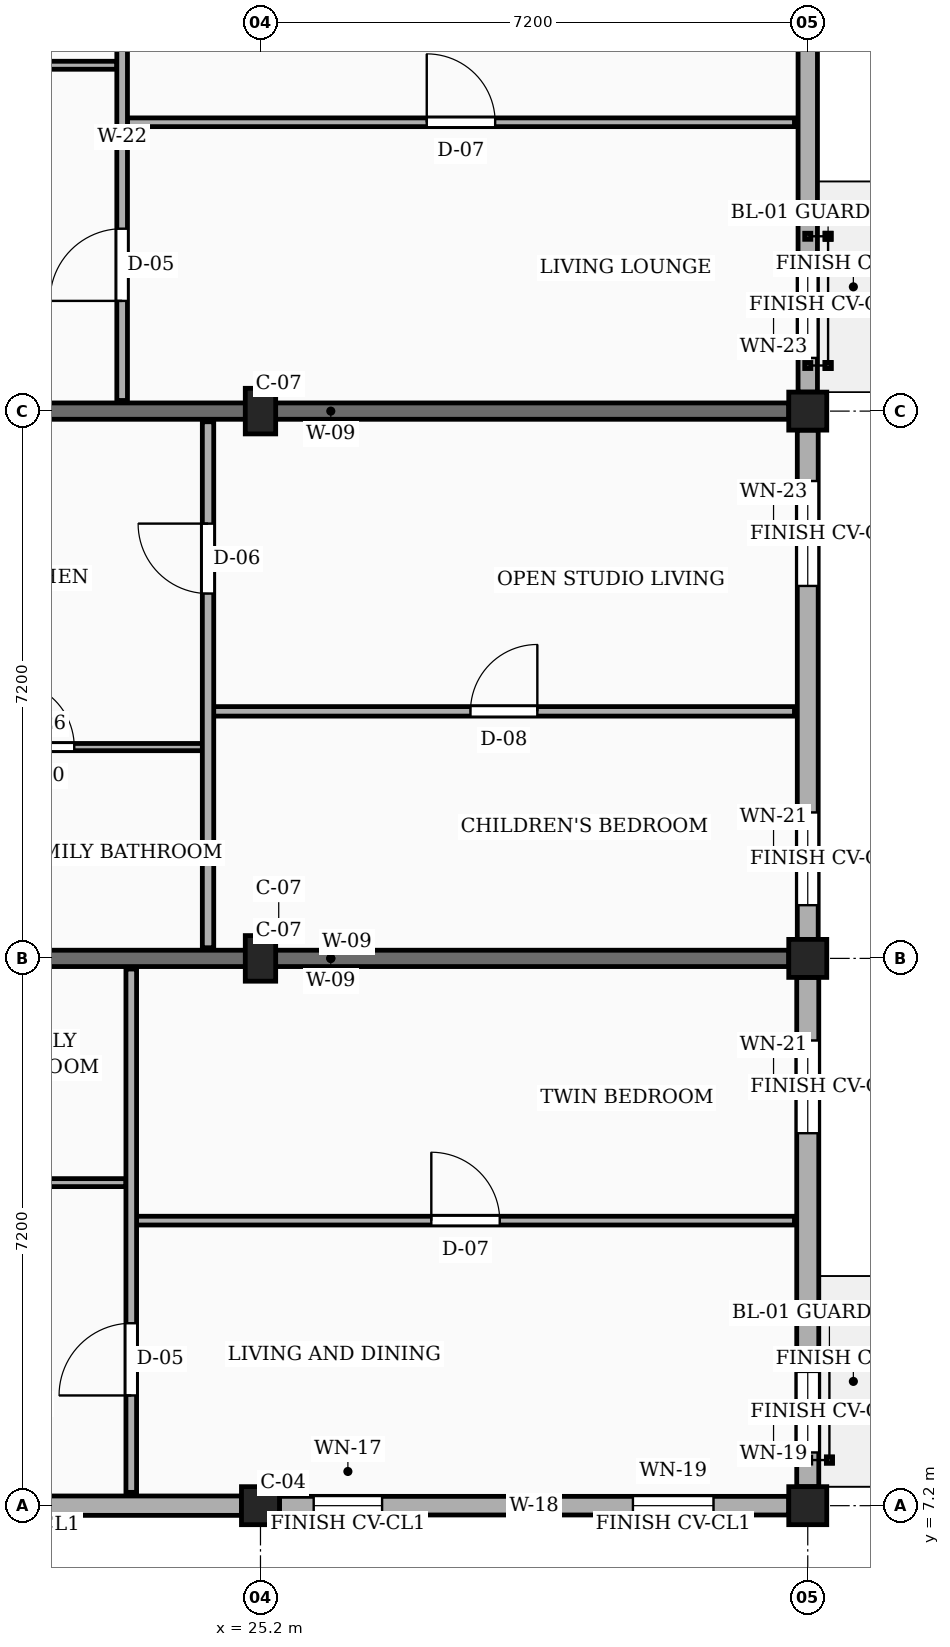
"""IFC4 building model, lengths in metres.
Left out: names, types, materials, properties, quantities, classifications, styles, units other than length and angle.
Written with IfcOpenShell. Run it as: python <this file> out.ifc"""

import sys

from ifc_helpers import new_model, si_unit, direction, frame, frame_2d, origin, origin_2d, place, context, subcontext, project, spatial, rectangle, extrude, element, fill, save


model = new_model("IFC4")
c1 = context("Model", 3, precision=1e-05, world=origin(), true_north=direction((0.0, 1.0)))
c2 = subcontext(c1, "Body", "Model", "MODEL_VIEW")
j1 = project(units=[si_unit("LENGTHUNIT", "METRE"), si_unit("PLANEANGLEUNIT", "RADIAN")], contexts=[c1])
p1 = place(None, origin())
s1 = spatial("IfcSite", under=j1, at=p1, CompositionType="ELEMENT")
p2 = place(p1, origin())
s2 = spatial("IfcBuilding", under=s1, at=p2, CompositionType="ELEMENT")
p3 = place(p2, frame((0.0, 0.0, 32.85)))
s3 = spatial("IfcBuildingStorey", under=s2, at=p3, CompositionType="ELEMENT", Elevation=32.85)
p4 = place(p3, frame((25.2, 7.2, 0.0), z_axis=(0.0, 0.0, 1.0), x_axis=(1.0, 0.0, 0.0)))
e1 = element("IfcColumn", 1, at=p4, inside=s3, PredefinedType="COLUMN", context=c2, shape_type="SweptSolid", body=[
    extrude(rectangle(XDim=0.5, YDim=0.5, at=origin_2d()), origin(), (0.0, 0.0, 1.0), 3.15),
])
for number, where, z_axis, x_axis in (
    (2, (25.2, 14.4, 0.0), (0.0, 0.0, 1.0), (1.0, 0.0, 0.0)),
    (3, (25.2, 21.6, 0.0), (0.0, 0.0, 1.0), (1.0, 0.0, 0.0)),
):
    element("IfcColumn", number, at=place(p3, frame(where, z_axis=z_axis, x_axis=x_axis)), inside=s3, PredefinedType="COLUMN", context=c2, shape_type="SweptSolid", body=[
        extrude(rectangle(XDim=0.4, YDim=0.6, at=origin_2d()), origin(), (0.0, 0.0, 1.0), 3.15),
    ])
for number, where, z_axis, x_axis in (
    (4, (32.4, 7.2, 0.0), (0.0, 0.0, 1.0), (1.0, 0.0, 0.0)),
    (5, (32.4, 14.4, 0.0), (0.0, 0.0, 1.0), (1.0, 0.0, 0.0)),
    (6, (32.4, 21.6, 0.0), (0.0, 0.0, 1.0), (1.0, 0.0, 0.0)),
):
    element("IfcColumn", number, at=place(p3, frame(where, z_axis=z_axis, x_axis=x_axis)), inside=s3, PredefinedType="COLUMN", context=c2, shape_type="SweptSolid", body=[
        extrude(rectangle(XDim=0.5, YDim=0.5, at=origin_2d()), origin(), (0.0, 0.0, 1.0), 3.15),
    ])
for number, where, z_axis, x_axis in (
    (7, (20.1, 14.4, 0.0), (0.0, 0.0, 1.0), (1.0, 0.0, 0.0)),
    (8, (20.1, 21.6, 0.0), (0.0, 0.0, 1.0), (1.0, 0.0, 0.0)),
):
    element("IfcWall", number, at=place(p3, frame(where, z_axis=z_axis, x_axis=x_axis)), inside=s3, PredefinedType="SOLIDWALL", context=c2, shape_type="SweptSolid", body=[
        extrude(rectangle(XDim=12.05, YDim=0.215, at=frame_2d((6.025, 0.0))), origin(), (0.0, 0.0, 1.0), 2.17),
    ])
p5 = place(p3, frame((18.25, 7.2, 0.0), z_axis=(0.0, 0.0, 1.0), x_axis=(1.0, 0.0, 0.0)))
e9 = element("IfcWall", 9, at=p5, inside=s3, PredefinedType="SOLIDWALL", context=c2, shape_type="SweptSolid", body=[
    extrude(rectangle(XDim=6.7, YDim=0.255, at=frame_2d((3.35, 0.0))), origin(), (0.0, 0.0, 1.0), 2.44),
])
p6 = place(p5, frame((0.475, 0.0, 0.78)))
e10 = element("IfcOpeningElement", 10, at=p6, cuts=e9, PredefinedType="OPENING", context=c2, shape_type="SweptSolid", body=[
    extrude(rectangle(XDim=1.04, YDim=1.26, at=frame_2d((0.52, 0.63))), frame((0.0, 0.137, 0.0), z_axis=(0.0, -1.0, 0.0), x_axis=(1.0, 0.0, 0.0)), (0.0, 0.0, 1.0), 0.275),
])
p7 = place(p5, frame((3.1, 0.0, 0.78)))
e11 = element("IfcOpeningElement", 11, at=p7, cuts=e9, PredefinedType="OPENING", context=c2, shape_type="SweptSolid", body=[
    extrude(rectangle(XDim=0.9, YDim=1.36, at=frame_2d((0.45, 0.68))), frame((0.0, 0.137, 0.0), z_axis=(0.0, -1.0, 0.0), x_axis=(1.0, 0.0, 0.0)), (0.0, 0.0, 1.0), 0.275),
])
p8 = place(p3, frame((25.45, 7.2, 0.0), z_axis=(0.0, 0.0, 1.0), x_axis=(1.0, 0.0, 0.0)))
e12 = element("IfcWall", 12, at=p8, inside=s3, PredefinedType="SOLIDWALL", context=c2, shape_type="SweptSolid", body=[
    extrude(rectangle(XDim=6.7, YDim=0.245, at=frame_2d((3.35, 0.0))), origin(), (0.0, 0.0, 1.0), 2.44),
])
p9 = place(p8, frame((0.45, 0.0, 0.78)))
e13 = element("IfcOpeningElement", 13, at=p9, cuts=e12, PredefinedType="OPENING", context=c2, shape_type="SweptSolid", body=[
    extrude(rectangle(XDim=0.9, YDim=1.36, at=frame_2d((0.45, 0.68))), frame((0.0, 0.133, 0.0), z_axis=(0.0, -1.0, 0.0), x_axis=(1.0, 0.0, 0.0)), (0.0, 0.0, 1.0), 0.265),
])
p10 = place(p8, frame((4.65, 0.0, 0.78)))
e14 = element("IfcOpeningElement", 14, at=p10, cuts=e12, PredefinedType="OPENING", context=c2, shape_type="SweptSolid", body=[
    extrude(rectangle(XDim=1.06, YDim=1.36, at=frame_2d((0.53, 0.68))), frame((0.0, 0.133, 0.0), z_axis=(0.0, -1.0, 0.0), x_axis=(1.0, 0.0, 0.0)), (0.0, 0.0, 1.0), 0.265),
])
p11 = place(p3, frame((32.4, 7.45, 0.0), z_axis=(0.0, 0.0, 1.0), x_axis=(0.0, 1.0, 0.0)))
e15 = element("IfcWall", 15, at=p11, inside=s3, PredefinedType="SOLIDWALL", context=c2, shape_type="SweptSolid", body=[
    extrude(rectangle(XDim=6.7, YDim=0.29, at=frame_2d((3.35, 0.0))), origin(), (0.0, 0.0, 1.0), 2.44),
])
p12 = place(p11, frame((0.45, 0.0, 0.78)))
e16 = element("IfcOpeningElement", 16, at=p12, cuts=e15, PredefinedType="OPENING", context=c2, shape_type="SweptSolid", body=[
    extrude(rectangle(XDim=1.06, YDim=1.36, at=frame_2d((0.53, 0.68))), frame((0.0, 0.155, 0.0), z_axis=(0.0, -1.0, 0.0), x_axis=(1.0, 0.0, 0.0)), (0.0, 0.0, 1.0), 0.31),
])
p13 = place(p11, frame((4.65, 0.0, 0.78)))
e17 = element("IfcOpeningElement", 17, at=p13, cuts=e15, PredefinedType="OPENING", context=c2, shape_type="SweptSolid", body=[
    extrude(rectangle(XDim=1.22, YDim=1.36, at=frame_2d((0.61, 0.68))), frame((0.0, 0.155, 0.0), z_axis=(0.0, -1.0, 0.0), x_axis=(1.0, 0.0, 0.0)), (0.0, 0.0, 1.0), 0.31),
])
p14 = place(p3, frame((32.4, 14.65, 0.0), z_axis=(0.0, 0.0, 1.0), x_axis=(0.0, 1.0, 0.0)))
e18 = element("IfcWall", 18, at=p14, inside=s3, PredefinedType="SOLIDWALL", context=c2, shape_type="SweptSolid", body=[
    extrude(rectangle(XDim=6.7, YDim=0.275, at=frame_2d((3.35, 0.0))), origin(), (0.0, 0.0, 1.0), 2.44),
])
p15 = place(p14, frame((0.45, 0.0, 0.78)))
e19 = element("IfcOpeningElement", 19, at=p15, cuts=e18, PredefinedType="OPENING", context=c2, shape_type="SweptSolid", body=[
    extrude(rectangle(XDim=1.22, YDim=1.36, at=frame_2d((0.61, 0.68))), frame((0.0, 0.147, 0.0), z_axis=(0.0, -1.0, 0.0), x_axis=(1.0, 0.0, 0.0)), (0.0, 0.0, 1.0), 0.295),
])
p16 = place(p14, frame((4.65, 0.0, 0.78)))
e20 = element("IfcOpeningElement", 20, at=p16, cuts=e18, PredefinedType="OPENING", context=c2, shape_type="SweptSolid", body=[
    extrude(rectangle(XDim=1.38, YDim=1.36, at=frame_2d((0.69, 0.68))), frame((0.0, 0.147, 0.0), z_axis=(0.0, -1.0, 0.0), x_axis=(1.0, 0.0, 0.0)), (0.0, 0.0, 1.0), 0.295),
])
p17 = place(p3, frame((32.4, 21.85, 0.0), z_axis=(0.0, 0.0, 1.0), x_axis=(0.0, 1.0, 0.0)))
e21 = element("IfcWall", 21, at=p17, inside=s3, PredefinedType="SOLIDWALL", context=c2, shape_type="SweptSolid", body=[
    extrude(rectangle(XDim=6.7, YDim=0.255, at=frame_2d((3.35, 0.0))), origin(), (0.0, 0.0, 1.0), 2.44),
])
p18 = place(p17, frame((0.45, 0.0, 0.78)))
e22 = element("IfcOpeningElement", 22, at=p18, cuts=e21, PredefinedType="OPENING", context=c2, shape_type="SweptSolid", body=[
    extrude(rectangle(XDim=1.38, YDim=1.36, at=frame_2d((0.69, 0.68))), frame((0.0, 0.137, 0.0), z_axis=(0.0, -1.0, 0.0), x_axis=(1.0, 0.0, 0.0)), (0.0, 0.0, 1.0), 0.275),
])
p19 = place(p17, frame((4.65, 0.0, 0.78)))
e23 = element("IfcOpeningElement", 23, at=p19, cuts=e21, PredefinedType="OPENING", context=c2, shape_type="SweptSolid", body=[
    extrude(rectangle(XDim=0.94, YDim=1.44, at=frame_2d((0.47, 0.72))), frame((0.0, 0.137, 0.0), z_axis=(0.0, -1.0, 0.0), x_axis=(1.0, 0.0, 0.0)), (0.0, 0.0, 1.0), 0.275),
])
p20 = place(p3, frame((23.57, 10.95, 0.0), z_axis=(0.0, 0.0, 1.0), x_axis=(1.0, 0.0, 0.0)))
e24 = element("IfcWall", 24, at=p20, inside=s3, PredefinedType="PARTITIONING", context=c2, shape_type="SweptSolid", body=[
    extrude(rectangle(XDim=8.655, YDim=0.115, at=frame_2d((4.328, 0.0))), origin(), (0.0, 0.0, 1.0), 2.305),
])
p21 = place(p20, frame((3.877, 0.0, 0.0)))
e25 = element("IfcOpeningElement", 25, at=p21, cuts=e24, PredefinedType="OPENING", context=c2, shape_type="SweptSolid", body=[
    extrude(rectangle(XDim=0.9, YDim=2.1, at=frame_2d((0.45, 1.05))), frame((0.0, 0.067, 0.0), z_axis=(0.0, -1.0, 0.0), x_axis=(1.0, 0.0, 0.0)), (0.0, 0.0, 1.0), 0.135),
])
p22 = place(p3, frame((20.19, 11.45, 0.0), z_axis=(0.0, 0.0, 1.0), x_axis=(1.0, 0.0, 0.0)))
e26 = element("IfcWall", 26, at=p22, inside=s3, PredefinedType="PARTITIONING", context=c2, shape_type="SweptSolid", body=[
    extrude(rectangle(XDim=3.24, YDim=0.105, at=frame_2d((1.62, 0.0))), origin(), (0.0, 0.0, 1.0), 2.305),
])
p23 = place(p22, frame((1.17, 0.0, 0.0)))
e27 = element("IfcOpeningElement", 27, at=p23, cuts=e26, PredefinedType="OPENING", context=c2, shape_type="SweptSolid", body=[
    extrude(rectangle(XDim=0.9, YDim=2.05, at=frame_2d((0.45, 1.025))), frame((0.0, 0.062, 0.0), z_axis=(0.0, -1.0, 0.0), x_axis=(1.0, 0.0, 0.0)), (0.0, 0.0, 1.0), 0.125),
])
p24 = place(p3, frame((23.5, 7.375, 0.0), z_axis=(0.0, 0.0, 1.0), x_axis=(0.0, 1.0, 0.0)))
e28 = element("IfcWall", 28, at=p24, inside=s3, PredefinedType="PARTITIONING", context=c2, shape_type="SweptSolid", body=[
    extrude(rectangle(XDim=6.885, YDim=0.14, at=frame_2d((3.442, 0.0))), origin(), (0.0, 0.0, 1.0), 2.305),
])
p25 = place(p24, frame((1.275, 0.0, 0.0)))
e29 = element("IfcOpeningElement", 29, at=p25, cuts=e28, PredefinedType="OPENING", context=c2, shape_type="SweptSolid", body=[
    extrude(rectangle(XDim=0.95, YDim=2.1, at=frame_2d((0.475, 1.05))), frame((0.0, 0.08, 0.0), z_axis=(0.0, -1.0, 0.0), x_axis=(1.0, 0.0, 0.0)), (0.0, 0.0, 1.0), 0.16),
])
p26 = place(p3, frame((24.58, 17.65, 0.0), z_axis=(0.0, 0.0, 1.0), x_axis=(1.0, 0.0, 0.0)))
e30 = element("IfcWall", 30, at=p26, inside=s3, PredefinedType="PARTITIONING", context=c2, shape_type="SweptSolid", body=[
    extrude(rectangle(XDim=7.645, YDim=0.125, at=frame_2d((3.823, 0.0))), origin(), (0.0, 0.0, 1.0), 2.305),
])
p27 = place(p26, frame((3.383, 0.0, 0.0)))
e31 = element("IfcOpeningElement", 31, at=p27, cuts=e30, PredefinedType="OPENING", context=c2, shape_type="SweptSolid", body=[
    extrude(rectangle(XDim=0.88, YDim=2.08, at=frame_2d((0.44, 1.04))), frame((0.0, 0.073, 0.0), z_axis=(0.0, -1.0, 0.0), x_axis=(1.0, 0.0, 0.0)), (0.0, 0.0, 1.0), 0.145),
])
p28 = place(p3, frame((20.19, 17.18, 0.0), z_axis=(0.0, 0.0, 1.0), x_axis=(1.0, 0.0, 0.0)))
e32 = element("IfcWall", 32, at=p28, inside=s3, PredefinedType="PARTITIONING", context=c2, shape_type="SweptSolid", body=[
    extrude(rectangle(XDim=4.25, YDim=0.095, at=frame_2d((2.125, 0.0))), origin(), (0.0, 0.0, 1.0), 2.305),
])
p29 = place(p28, frame((1.69, 0.0, 0.0)))
e33 = element("IfcOpeningElement", 33, at=p29, cuts=e32, PredefinedType="OPENING", context=c2, shape_type="SweptSolid", body=[
    extrude(rectangle(XDim=0.87, YDim=2.05, at=frame_2d((0.435, 1.025))), frame((0.0, 0.058, 0.0), z_axis=(0.0, -1.0, 0.0), x_axis=(1.0, 0.0, 0.0)), (0.0, 0.0, 1.0), 0.115),
])
p30 = place(p3, frame((24.51, 14.54, 0.0), z_axis=(0.0, 0.0, 1.0), x_axis=(0.0, 1.0, 0.0)))
e34 = element("IfcWall", 34, at=p30, inside=s3, PredefinedType="PARTITIONING", context=c2, shape_type="SweptSolid", body=[
    extrude(rectangle(XDim=6.92, YDim=0.15, at=frame_2d((3.46, 0.0))), origin(), (0.0, 0.0, 1.0), 2.305),
])
p31 = place(p30, frame((4.66, 0.0, 0.0)))
e35 = element("IfcOpeningElement", 35, at=p31, cuts=e34, PredefinedType="OPENING", context=c2, shape_type="SweptSolid", body=[
    extrude(rectangle(XDim=0.92, YDim=2.1, at=frame_2d((0.46, 1.05))), frame((0.0, 0.085, 0.0), z_axis=(0.0, -1.0, 0.0), x_axis=(1.0, 0.0, 0.0)), (0.0, 0.0, 1.0), 0.17),
])
p32 = place(p3, frame((23.45, 25.4, 0.0), z_axis=(0.0, 0.0, 1.0), x_axis=(1.0, 0.0, 0.0)))
e36 = element("IfcWall", 36, at=p32, inside=s3, PredefinedType="PARTITIONING", context=c2, shape_type="SweptSolid", body=[
    extrude(rectangle(XDim=8.775, YDim=0.115, at=frame_2d((4.388, 0.0))), origin(), (0.0, 0.0, 1.0), 2.305),
])
p33 = place(p32, frame((3.938, 0.0, 0.0)))
e37 = element("IfcOpeningElement", 37, at=p33, cuts=e36, PredefinedType="OPENING", context=c2, shape_type="SweptSolid", body=[
    extrude(rectangle(XDim=0.9, YDim=2.1, at=frame_2d((0.45, 1.05))), frame((0.0, 0.067, 0.0), z_axis=(0.0, -1.0, 0.0), x_axis=(1.0, 0.0, 0.0)), (0.0, 0.0, 1.0), 0.135),
])
p34 = place(p3, frame((20.19, 26.15, 0.0), z_axis=(0.0, 0.0, 1.0), x_axis=(1.0, 0.0, 0.0)))
e38 = element("IfcWall", 38, at=p34, inside=s3, PredefinedType="PARTITIONING", context=c2, shape_type="SweptSolid", body=[
    extrude(rectangle(XDim=3.12, YDim=0.105, at=frame_2d((1.56, 0.0))), origin(), (0.0, 0.0, 1.0), 2.305),
])
p35 = place(p34, frame((1.11, 0.0, 0.0)))
e39 = element("IfcOpeningElement", 39, at=p35, cuts=e38, PredefinedType="OPENING", context=c2, shape_type="SweptSolid", body=[
    extrude(rectangle(XDim=0.9, YDim=2.05, at=frame_2d((0.45, 1.025))), frame((0.0, 0.062, 0.0), z_axis=(0.0, -1.0, 0.0), x_axis=(1.0, 0.0, 0.0)), (0.0, 0.0, 1.0), 0.125),
])
p36 = place(p3, frame((23.38, 21.74, 0.0), z_axis=(0.0, 0.0, 1.0), x_axis=(0.0, 1.0, 0.0)))
e40 = element("IfcWall", 40, at=p36, inside=s3, PredefinedType="PARTITIONING", context=c2, shape_type="SweptSolid", body=[
    extrude(rectangle(XDim=6.92, YDim=0.14, at=frame_2d((3.46, 0.0))), origin(), (0.0, 0.0, 1.0), 2.305),
])
p37 = place(p36, frame((1.31, 0.0, 0.0)))
e41 = element("IfcOpeningElement", 41, at=p37, cuts=e40, PredefinedType="OPENING", context=c2, shape_type="SweptSolid", body=[
    extrude(rectangle(XDim=0.95, YDim=2.1, at=frame_2d((0.475, 1.05))), frame((0.0, 0.08, 0.0), z_axis=(0.0, -1.0, 0.0), x_axis=(1.0, 0.0, 0.0)), (0.0, 0.0, 1.0), 0.16),
])
p38 = place(p9, origin())
e42 = element("IfcWindow", 42, at=p38, inside=s3, PartitioningType="SINGLE_PANEL", PredefinedType="WINDOW", context=c2, shape_type="SweptSolid", body=[
    extrude(rectangle(XDim=0.9, YDim=1.36, at=frame_2d((0.45, 0.68))), frame((0.0, 0.03, 0.0), z_axis=(0.0, -1.0, 0.0), x_axis=(1.0, 0.0, 0.0)), (0.0, 0.0, 1.0), 0.06),
])
fill(e13, e42)
p39 = place(p10, origin())
e43 = element("IfcWindow", 43, at=p39, inside=s3, PartitioningType="SINGLE_PANEL", PredefinedType="WINDOW", context=c2, shape_type="SweptSolid", body=[
    extrude(rectangle(XDim=1.06, YDim=1.36, at=frame_2d((0.53, 0.68))), frame((0.0, 0.03, 0.0), z_axis=(0.0, -1.0, 0.0), x_axis=(1.0, 0.0, 0.0)), (0.0, 0.0, 1.0), 0.06),
])
fill(e14, e43)
p40 = place(p12, origin())
e44 = element("IfcWindow", 44, at=p40, inside=s3, PartitioningType="SINGLE_PANEL", PredefinedType="WINDOW", context=c2, shape_type="SweptSolid", body=[
    extrude(rectangle(XDim=1.06, YDim=1.36, at=frame_2d((0.53, 0.68))), frame((0.0, 0.03, 0.0), z_axis=(0.0, -1.0, 0.0), x_axis=(1.0, 0.0, 0.0)), (0.0, 0.0, 1.0), 0.06),
])
fill(e16, e44)
p41 = place(p13, origin())
e45 = element("IfcWindow", 45, at=p41, inside=s3, PartitioningType="SINGLE_PANEL", PredefinedType="WINDOW", context=c2, shape_type="SweptSolid", body=[
    extrude(rectangle(XDim=1.22, YDim=1.36, at=frame_2d((0.61, 0.68))), frame((0.0, 0.03, 0.0), z_axis=(0.0, -1.0, 0.0), x_axis=(1.0, 0.0, 0.0)), (0.0, 0.0, 1.0), 0.06),
])
fill(e17, e45)
p42 = place(p15, origin())
e46 = element("IfcWindow", 46, at=p42, inside=s3, PartitioningType="SINGLE_PANEL", PredefinedType="WINDOW", context=c2, shape_type="SweptSolid", body=[
    extrude(rectangle(XDim=1.22, YDim=1.36, at=frame_2d((0.61, 0.68))), frame((0.0, 0.03, 0.0), z_axis=(0.0, -1.0, 0.0), x_axis=(1.0, 0.0, 0.0)), (0.0, 0.0, 1.0), 0.06),
])
fill(e19, e46)
p43 = place(p16, origin())
e47 = element("IfcWindow", 47, at=p43, inside=s3, PartitioningType="SINGLE_PANEL", PredefinedType="WINDOW", context=c2, shape_type="SweptSolid", body=[
    extrude(rectangle(XDim=1.38, YDim=1.36, at=frame_2d((0.69, 0.68))), frame((0.0, 0.03, 0.0), z_axis=(0.0, -1.0, 0.0), x_axis=(1.0, 0.0, 0.0)), (0.0, 0.0, 1.0), 0.06),
])
fill(e20, e47)
p44 = place(p18, origin())
e48 = element("IfcWindow", 48, at=p44, inside=s3, PartitioningType="SINGLE_PANEL", PredefinedType="WINDOW", context=c2, shape_type="SweptSolid", body=[
    extrude(rectangle(XDim=1.38, YDim=1.36, at=frame_2d((0.69, 0.68))), frame((0.0, 0.03, 0.0), z_axis=(0.0, -1.0, 0.0), x_axis=(1.0, 0.0, 0.0)), (0.0, 0.0, 1.0), 0.06),
])
fill(e22, e48)
p45 = place(p21, origin())
e49 = element("IfcDoor", 49, at=p45, inside=s3, OperationType="SINGLE_SWING_LEFT", PredefinedType="DOOR", context=c2, shape_type="SweptSolid", body=[
    extrude(rectangle(XDim=0.9, YDim=2.1, at=frame_2d((0.45, 1.05))), frame((0.0, 0.025, 0.0), z_axis=(0.0, -1.0, 0.0), x_axis=(1.0, 0.0, 0.0)), (0.0, 0.0, 1.0), 0.05),
])
fill(e25, e49)
p46 = place(p25, origin())
e50 = element("IfcDoor", 50, at=p46, inside=s3, OperationType="SINGLE_SWING_LEFT", PredefinedType="DOOR", context=c2, shape_type="SweptSolid", body=[
    extrude(rectangle(XDim=0.95, YDim=2.1, at=frame_2d((0.475, 1.05))), frame((0.0, 0.025, 0.0), z_axis=(0.0, -1.0, 0.0), x_axis=(1.0, 0.0, 0.0)), (0.0, 0.0, 1.0), 0.05),
])
fill(e29, e50)
p47 = place(p27, origin())
e51 = element("IfcDoor", 51, at=p47, inside=s3, OperationType="SINGLE_SWING_RIGHT", PredefinedType="DOOR", context=c2, shape_type="SweptSolid", body=[
    extrude(rectangle(XDim=0.88, YDim=2.08, at=frame_2d((0.44, 1.04))), frame((0.0, 0.025, 0.0), z_axis=(0.0, -1.0, 0.0), x_axis=(1.0, 0.0, 0.0)), (0.0, 0.0, 1.0), 0.05),
])
fill(e31, e51)
p48 = place(p29, origin())
e52 = element("IfcDoor", 52, at=p48, inside=s3, OperationType="SINGLE_SWING_LEFT", PredefinedType="DOOR", context=c2, shape_type="SweptSolid", body=[
    extrude(rectangle(XDim=0.87, YDim=2.05, at=frame_2d((0.435, 1.025))), frame((0.0, 0.025, 0.0), z_axis=(0.0, -1.0, 0.0), x_axis=(1.0, 0.0, 0.0)), (0.0, 0.0, 1.0), 0.05),
])
fill(e33, e52)
p49 = place(p31, origin())
e53 = element("IfcDoor", 53, at=p49, inside=s3, OperationType="SINGLE_SWING_RIGHT", PredefinedType="DOOR", context=c2, shape_type="SweptSolid", body=[
    extrude(rectangle(XDim=0.92, YDim=2.1, at=frame_2d((0.46, 1.05))), frame((0.0, 0.025, 0.0), z_axis=(0.0, -1.0, 0.0), x_axis=(1.0, 0.0, 0.0)), (0.0, 0.0, 1.0), 0.05),
])
fill(e35, e53)
p50 = place(p33, origin())
e54 = element("IfcDoor", 54, at=p50, inside=s3, OperationType="SINGLE_SWING_LEFT", PredefinedType="DOOR", context=c2, shape_type="SweptSolid", body=[
    extrude(rectangle(XDim=0.9, YDim=2.1, at=frame_2d((0.45, 1.05))), frame((0.0, 0.025, 0.0), z_axis=(0.0, -1.0, 0.0), x_axis=(1.0, 0.0, 0.0)), (0.0, 0.0, 1.0), 0.05),
])
fill(e37, e54)
p51 = place(p37, origin())
e55 = element("IfcDoor", 55, at=p51, inside=s3, OperationType="SINGLE_SWING_LEFT", PredefinedType="DOOR", context=c2, shape_type="SweptSolid", body=[
    extrude(rectangle(XDim=0.95, YDim=2.1, at=frame_2d((0.475, 1.05))), frame((0.0, 0.025, 0.0), z_axis=(0.0, -1.0, 0.0), x_axis=(1.0, 0.0, 0.0)), (0.0, 0.0, 1.0), 0.05),
])
fill(e41, e55)
save(model, sys.argv[1])
